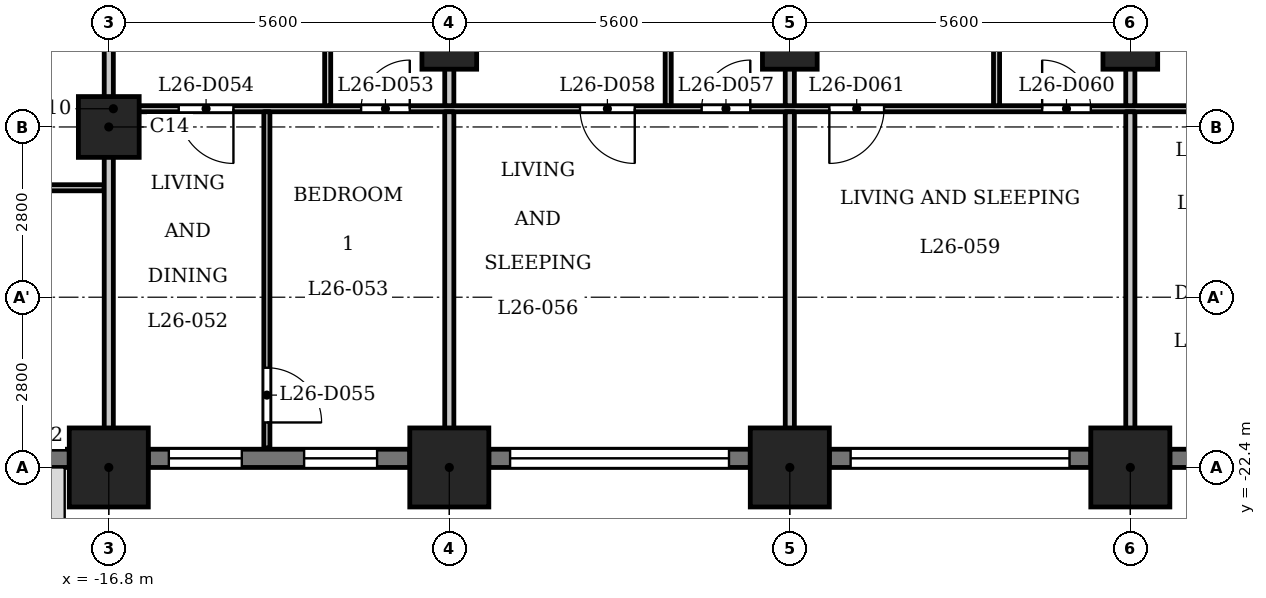
"""IFC4 building model, lengths in metres.
Left out: names, types, materials, properties, quantities, classifications, styles, units other than length and angle.
Written with IfcOpenShell. Run it as: python <this file> out.ifc"""

import sys

from ifc_helpers import new_model, si_unit, direction, frame, frame_2d, origin, origin_2d, place, context, subcontext, project, spatial, rectangle, extrude, element, fill, save


model = new_model("IFC4")
c1 = context("Model", 3, precision=1e-05, world=origin(), true_north=direction((0.0, 1.0)))
c2 = subcontext(c1, "Body", "Model", "MODEL_VIEW")
j1 = project(units=[si_unit("LENGTHUNIT", "METRE"), si_unit("PLANEANGLEUNIT", "RADIAN")], contexts=[c1])
p1 = place(None, origin())
s1 = spatial("IfcSite", under=j1, at=p1, CompositionType="ELEMENT")
p2 = place(p1, origin())
s2 = spatial("IfcBuilding", under=s1, at=p2, CompositionType="ELEMENT")
p3 = place(p2, frame((0.0, 0.0, 104.3)))
s3 = spatial("IfcBuildingStorey", under=s2, at=p3, CompositionType="ELEMENT", Elevation=104.3)
for number, where, z_axis, x_axis in (
    (1, (-16.8, -22.4, 0.0), (0.0, 0.0, 1.0), (1.0, 0.0, 0.0)),
    (2, (-11.2, -22.4, 0.0), (0.0, 0.0, 1.0), (1.0, 0.0, 0.0)),
    (3, (-5.6, -22.4, 0.0), (0.0, 0.0, 1.0), (1.0, 0.0, 0.0)),
    (4, (0.0, -22.4, 0.0), (0.0, 0.0, 1.0), (1.0, 0.0, 0.0)),
):
    element("IfcColumn", number, at=place(p3, frame(where, z_axis=z_axis, x_axis=x_axis)), inside=s3, PredefinedType="COLUMN", context=c2, shape_type="SweptSolid", body=[
        extrude(rectangle(XDim=1.3, YDim=1.3, at=origin_2d()), origin(), (0.0, 0.0, 1.0), 3.5),
    ])
p4 = place(p3, frame((-16.8, -16.8, 0.0), z_axis=(0.0, 0.0, 1.0), x_axis=(1.0, 0.0, 0.0)))
e5 = element("IfcColumn", 5, at=p4, inside=s3, PredefinedType="COLUMN", context=c2, shape_type="SweptSolid", body=[
    extrude(rectangle(XDim=1.0, YDim=1.0, at=origin_2d()), origin(), (0.0, 0.0, 1.0), 3.5),
])
for number, where, z_axis, x_axis in (
    (6, (-11.2, -15.4, 0.0), (0.0, 0.0, 1.0), (1.0, 0.0, 0.0)),
    (7, (-5.6, -15.4, 0.0), (0.0, 0.0, 1.0), (1.0, 0.0, 0.0)),
    (8, (0.0, -15.4, 0.0), (0.0, 0.0, 1.0), (1.0, 0.0, 0.0)),
):
    element("IfcColumn", number, at=place(p3, frame(where, z_axis=z_axis, x_axis=x_axis)), inside=s3, PredefinedType="COLUMN", context=c2, shape_type="SweptSolid", body=[
        extrude(rectangle(XDim=0.9, YDim=0.9, at=origin_2d()), origin(), (0.0, 0.0, 1.0), 3.5),
    ])
p5 = place(p3, frame((-20.0, -22.25, 0.0), z_axis=(0.0, 0.0, 1.0), x_axis=(1.0, 0.0, 0.0)))
e9 = element("IfcWall", 9, at=p5, inside=s3, PredefinedType="SOLIDWALL", context=c2, shape_type="SweptSolid", body=[
    extrude(rectangle(XDim=2.55, YDim=0.3, at=frame_2d((1.275, 0.0))), origin(), (0.0, 0.0, 1.0), 2.4),
])
p6 = place(p5, frame((0.375, 0.0, 0.9)))
e10 = element("IfcOpeningElement", 10, at=p6, cuts=e9, PredefinedType="OPENING", context=c2, shape_type="SweptSolid", body=[
    extrude(rectangle(XDim=1.8, YDim=1.25, at=frame_2d((0.9, 0.625))), frame((0.0, 0.16, 0.0), z_axis=(0.0, -1.0, 0.0), x_axis=(1.0, 0.0, 0.0)), (0.0, 0.0, 1.0), 0.32),
])
p7 = place(p3, frame((-16.15, -22.25, 0.0), z_axis=(0.0, 0.0, 1.0), x_axis=(1.0, 0.0, 0.0)))
e11 = element("IfcWall", 11, at=p7, inside=s3, PredefinedType="SOLIDWALL", context=c2, shape_type="SweptSolid", body=[
    extrude(rectangle(XDim=4.3, YDim=0.3, at=frame_2d((2.15, 0.0))), origin(), (0.0, 0.0, 1.0), 2.4),
])
p8 = place(p7, frame((0.337, 0.0, 0.6)))
e12 = element("IfcOpeningElement", 12, at=p8, cuts=e11, PredefinedType="OPENING", context=c2, shape_type="SweptSolid", body=[
    extrude(rectangle(XDim=1.2, YDim=1.55, at=frame_2d((0.6, 0.775))), frame((0.0, 0.16, 0.0), z_axis=(0.0, -1.0, 0.0), x_axis=(1.0, 0.0, 0.0)), (0.0, 0.0, 1.0), 0.32),
])
p9 = place(p7, frame((2.562, 0.0, 0.6)))
e13 = element("IfcOpeningElement", 13, at=p9, cuts=e11, PredefinedType="OPENING", context=c2, shape_type="SweptSolid", body=[
    extrude(rectangle(XDim=1.2, YDim=1.55, at=frame_2d((0.6, 0.775))), frame((0.0, 0.16, 0.0), z_axis=(0.0, -1.0, 0.0), x_axis=(1.0, 0.0, 0.0)), (0.0, 0.0, 1.0), 0.32),
])
p10 = place(p3, frame((-10.55, -22.25, 0.0), z_axis=(0.0, 0.0, 1.0), x_axis=(1.0, 0.0, 0.0)))
e14 = element("IfcWall", 14, at=p10, inside=s3, PredefinedType="SOLIDWALL", context=c2, shape_type="SweptSolid", body=[
    extrude(rectangle(XDim=4.3, YDim=0.3, at=frame_2d((2.15, 0.0))), origin(), (0.0, 0.0, 1.0), 2.4),
])
p11 = place(p10, frame((0.35, 0.0, 1.2)))
e15 = element("IfcOpeningElement", 15, at=p11, cuts=e14, PredefinedType="OPENING", context=c2, shape_type="SweptSolid", body=[
    extrude(rectangle(XDim=3.6, YDim=0.95, at=frame_2d((1.8, 0.475))), frame((0.0, 0.16, 0.0), z_axis=(0.0, -1.0, 0.0), x_axis=(1.0, 0.0, 0.0)), (0.0, 0.0, 1.0), 0.32),
])
p12 = place(p3, frame((-4.95, -22.25, 0.0), z_axis=(0.0, 0.0, 1.0), x_axis=(1.0, 0.0, 0.0)))
e16 = element("IfcWall", 16, at=p12, inside=s3, PredefinedType="SOLIDWALL", context=c2, shape_type="SweptSolid", body=[
    extrude(rectangle(XDim=4.3, YDim=0.3, at=frame_2d((2.15, 0.0))), origin(), (0.0, 0.0, 1.0), 2.4),
])
p13 = place(p12, frame((0.35, 0.0, 1.2)))
e17 = element("IfcOpeningElement", 17, at=p13, cuts=e16, PredefinedType="OPENING", context=c2, shape_type="SweptSolid", body=[
    extrude(rectangle(XDim=3.6, YDim=0.95, at=frame_2d((1.8, 0.475))), frame((0.0, 0.16, 0.0), z_axis=(0.0, -1.0, 0.0), x_axis=(1.0, 0.0, 0.0)), (0.0, 0.0, 1.0), 0.32),
])
p14 = place(p3, frame((0.65, -22.25, 0.0), z_axis=(0.0, 0.0, 1.0), x_axis=(1.0, 0.0, 0.0)))
e18 = element("IfcWall", 18, at=p14, inside=s3, PredefinedType="SOLIDWALL", context=c2, shape_type="SweptSolid", body=[
    extrude(rectangle(XDim=4.3, YDim=0.3, at=frame_2d((2.15, 0.0))), origin(), (0.0, 0.0, 1.0), 2.4),
])
p15 = place(p14, frame((0.337, 0.0, 0.9)))
e19 = element("IfcOpeningElement", 19, at=p15, cuts=e18, PredefinedType="OPENING", context=c2, shape_type="SweptSolid", body=[
    extrude(rectangle(XDim=1.8, YDim=1.25, at=frame_2d((0.9, 0.625))), frame((0.0, 0.16, 0.0), z_axis=(0.0, -1.0, 0.0), x_axis=(1.0, 0.0, 0.0)), (0.0, 0.0, 1.0), 0.32),
])
p16 = place(p14, frame((3.062, 0.0, 0.6)))
e20 = element("IfcOpeningElement", 20, at=p16, cuts=e18, PredefinedType="OPENING", context=c2, shape_type="SweptSolid", body=[
    extrude(rectangle(XDim=0.8, YDim=1.55, at=frame_2d((0.4, 0.775))), frame((0.0, 0.16, 0.0), z_axis=(0.0, -1.0, 0.0), x_axis=(1.0, 0.0, 0.0)), (0.0, 0.0, 1.0), 0.32),
])
p17 = place(p3, frame((-26.394, -17.8, 0.0), z_axis=(0.0, 0.0, 1.0), x_axis=(1.0, 0.0, 0.0)))
e21 = element("IfcWall", 21, at=p17, inside=s3, PredefinedType="PARTITIONING", context=c2, shape_type="SweptSolid", body=[
    extrude(rectangle(XDim=9.519, YDim=0.1, at=frame_2d((4.76, 0.0))), origin(), (0.0, 0.0, 1.0), 3.2),
])
p18 = place(p17, frame((0.794, 0.0, 0.0)))
e22 = element("IfcOpeningElement", 22, at=p18, cuts=e21, PredefinedType="OPENING", context=c2, shape_type="SweptSolid", body=[
    extrude(rectangle(XDim=0.8, YDim=2.1, at=frame_2d((0.4, 1.05))), frame((0.0, 0.06, 0.0), z_axis=(0.0, -1.0, 0.0), x_axis=(1.0, 0.0, 0.0)), (0.0, 0.0, 1.0), 0.12),
])
p19 = place(p17, frame((5.644, 0.0, 0.0)))
e23 = element("IfcOpeningElement", 23, at=p19, cuts=e21, PredefinedType="OPENING", context=c2, shape_type="SweptSolid", body=[
    extrude(rectangle(XDim=0.9, YDim=2.1, at=frame_2d((0.45, 1.05))), frame((0.0, 0.06, 0.0), z_axis=(0.0, -1.0, 0.0), x_axis=(1.0, 0.0, 0.0)), (0.0, 0.0, 1.0), 0.12),
])
p20 = place(p3, frame((-16.725, -16.5, 0.0), z_axis=(0.0, 0.0, 1.0), x_axis=(1.0, 0.0, 0.0)))
e24 = element("IfcWall", 24, at=p20, inside=s3, PredefinedType="PARTITIONING", context=c2, shape_type="SweptSolid", body=[
    extrude(rectangle(XDim=33.45, YDim=0.1, at=frame_2d((16.725, 0.0))), origin(), (0.0, 0.0, 1.0), 3.2),
])
p21 = place(p20, frame((4.075, 0.0, 0.0)))
e25 = element("IfcOpeningElement", 25, at=p21, cuts=e24, PredefinedType="OPENING", context=c2, shape_type="SweptSolid", body=[
    extrude(rectangle(XDim=0.8, YDim=2.1, at=frame_2d((0.4, 1.05))), frame((0.0, 0.06, 0.0), z_axis=(0.0, -1.0, 0.0), x_axis=(1.0, 0.0, 0.0)), (0.0, 0.0, 1.0), 0.12),
])
p22 = place(p20, frame((1.075, 0.0, 0.0)))
e26 = element("IfcOpeningElement", 26, at=p22, cuts=e24, PredefinedType="OPENING", context=c2, shape_type="SweptSolid", body=[
    extrude(rectangle(XDim=0.9, YDim=2.1, at=frame_2d((0.45, 1.05))), frame((0.0, 0.06, 0.0), z_axis=(0.0, -1.0, 0.0), x_axis=(1.0, 0.0, 0.0)), (0.0, 0.0, 1.0), 0.12),
])
p23 = place(p20, frame((9.675, 0.0, 0.0)))
e27 = element("IfcOpeningElement", 27, at=p23, cuts=e24, PredefinedType="OPENING", context=c2, shape_type="SweptSolid", body=[
    extrude(rectangle(XDim=0.8, YDim=2.1, at=frame_2d((0.4, 1.05))), frame((0.0, 0.06, 0.0), z_axis=(0.0, -1.0, 0.0), x_axis=(1.0, 0.0, 0.0)), (0.0, 0.0, 1.0), 0.12),
])
p24 = place(p20, frame((7.675, 0.0, 0.0)))
e28 = element("IfcOpeningElement", 28, at=p24, cuts=e24, PredefinedType="OPENING", context=c2, shape_type="SweptSolid", body=[
    extrude(rectangle(XDim=0.9, YDim=2.1, at=frame_2d((0.45, 1.05))), frame((0.0, 0.06, 0.0), z_axis=(0.0, -1.0, 0.0), x_axis=(1.0, 0.0, 0.0)), (0.0, 0.0, 1.0), 0.12),
])
p25 = place(p20, frame((15.275, 0.0, 0.0)))
e29 = element("IfcOpeningElement", 29, at=p25, cuts=e24, PredefinedType="OPENING", context=c2, shape_type="SweptSolid", body=[
    extrude(rectangle(XDim=0.8, YDim=2.1, at=frame_2d((0.4, 1.05))), frame((0.0, 0.06, 0.0), z_axis=(0.0, -1.0, 0.0), x_axis=(1.0, 0.0, 0.0)), (0.0, 0.0, 1.0), 0.12),
])
p26 = place(p20, frame((11.775, 0.0, 0.0)))
e30 = element("IfcOpeningElement", 30, at=p26, cuts=e24, PredefinedType="OPENING", context=c2, shape_type="SweptSolid", body=[
    extrude(rectangle(XDim=0.9, YDim=2.1, at=frame_2d((0.45, 1.05))), frame((0.0, 0.06, 0.0), z_axis=(0.0, -1.0, 0.0), x_axis=(1.0, 0.0, 0.0)), (0.0, 0.0, 1.0), 0.12),
])
p27 = place(p20, frame((20.625, 0.0, 0.0)))
e31 = element("IfcOpeningElement", 31, at=p27, cuts=e24, PredefinedType="OPENING", context=c2, shape_type="SweptSolid", body=[
    extrude(rectangle(XDim=0.8, YDim=2.1, at=frame_2d((0.4, 1.05))), frame((0.0, 0.06, 0.0), z_axis=(0.0, -1.0, 0.0), x_axis=(1.0, 0.0, 0.0)), (0.0, 0.0, 1.0), 0.12),
])
p28 = place(p20, frame((18.375, 0.0, 0.0)))
e32 = element("IfcOpeningElement", 32, at=p28, cuts=e24, PredefinedType="OPENING", context=c2, shape_type="SweptSolid", body=[
    extrude(rectangle(XDim=0.9, YDim=2.1, at=frame_2d((0.45, 1.05))), frame((0.0, 0.06, 0.0), z_axis=(0.0, -1.0, 0.0), x_axis=(1.0, 0.0, 0.0)), (0.0, 0.0, 1.0), 0.12),
])
p29 = place(p20, frame((26.475, 0.0, 0.0)))
e33 = element("IfcOpeningElement", 33, at=p29, cuts=e24, PredefinedType="OPENING", context=c2, shape_type="SweptSolid", body=[
    extrude(rectangle(XDim=0.8, YDim=2.1, at=frame_2d((0.4, 1.05))), frame((0.0, 0.06, 0.0), z_axis=(0.0, -1.0, 0.0), x_axis=(1.0, 0.0, 0.0)), (0.0, 0.0, 1.0), 0.12),
])
p30 = place(p20, frame((23.225, 0.0, 0.0)))
e34 = element("IfcOpeningElement", 34, at=p30, cuts=e24, PredefinedType="OPENING", context=c2, shape_type="SweptSolid", body=[
    extrude(rectangle(XDim=0.9, YDim=2.1, at=frame_2d((0.45, 1.05))), frame((0.0, 0.06, 0.0), z_axis=(0.0, -1.0, 0.0), x_axis=(1.0, 0.0, 0.0)), (0.0, 0.0, 1.0), 0.12),
])
p31 = place(p20, frame((29.475, 0.0, 0.0)))
e35 = element("IfcOpeningElement", 35, at=p31, cuts=e24, PredefinedType="OPENING", context=c2, shape_type="SweptSolid", body=[
    extrude(rectangle(XDim=0.8, YDim=2.1, at=frame_2d((0.4, 1.05))), frame((0.0, 0.06, 0.0), z_axis=(0.0, -1.0, 0.0), x_axis=(1.0, 0.0, 0.0)), (0.0, 0.0, 1.0), 0.12),
])
p32 = place(p20, frame((31.825, 0.0, 0.0)))
e36 = element("IfcOpeningElement", 36, at=p32, cuts=e24, PredefinedType="OPENING", context=c2, shape_type="SweptSolid", body=[
    extrude(rectangle(XDim=0.9, YDim=2.1, at=frame_2d((0.45, 1.05))), frame((0.0, 0.06, 0.0), z_axis=(0.0, -1.0, 0.0), x_axis=(1.0, 0.0, 0.0)), (0.0, 0.0, 1.0), 0.12),
])
p33 = place(p3, frame((-16.8, -23.03, 0.0), z_axis=(0.0, 0.0, 1.0), x_axis=(0.0, 1.0, 0.0)))
e37 = element("IfcWall", 37, at=p33, inside=s3, PredefinedType="PARTITIONING", context=c2, shape_type="SweptSolid", body=[
    extrude(rectangle(XDim=7.555, YDim=0.15, at=frame_2d((3.777, 0.0))), origin(), (0.0, 0.0, 1.0), 3.2),
])
p34 = place(p3, frame((-14.2, -22.08, 0.0), z_axis=(0.0, 0.0, 1.0), x_axis=(0.0, 1.0, 0.0)))
e38 = element("IfcWall", 38, at=p34, inside=s3, PredefinedType="PARTITIONING", context=c2, shape_type="SweptSolid", body=[
    extrude(rectangle(XDim=5.53, YDim=0.1, at=frame_2d((2.765, 0.0))), origin(), (0.0, 0.0, 1.0), 3.2),
])
p35 = place(p34, frame((0.42, 0.0, 0.0)))
e39 = element("IfcOpeningElement", 39, at=p35, cuts=e38, PredefinedType="OPENING", context=c2, shape_type="SweptSolid", body=[
    extrude(rectangle(XDim=0.9, YDim=2.1, at=frame_2d((0.45, 1.05))), frame((0.0, 0.06, 0.0), z_axis=(0.0, -1.0, 0.0), x_axis=(1.0, 0.0, 0.0)), (0.0, 0.0, 1.0), 0.12),
])
p36 = place(p3, frame((-13.2, -16.45, 0.0), z_axis=(0.0, 0.0, 1.0), x_axis=(0.0, 1.0, 0.0)))
e40 = element("IfcWall", 40, at=p36, inside=s3, PredefinedType="PARTITIONING", context=c2, shape_type="SweptSolid", body=[
    extrude(rectangle(XDim=3.175, YDim=0.1, at=frame_2d((1.587, 0.0))), origin(), (0.0, 0.0, 1.0), 3.2),
])
p37 = place(p3, frame((-11.2, -23.03, 0.0), z_axis=(0.0, 0.0, 1.0), x_axis=(0.0, 1.0, 0.0)))
e41 = element("IfcWall", 41, at=p37, inside=s3, PredefinedType="PARTITIONING", context=c2, shape_type="SweptSolid", body=[
    extrude(rectangle(XDim=6.48, YDim=0.15, at=frame_2d((3.24, 0.0))), origin(), (0.0, 0.0, 1.0), 3.2),
])
p38 = place(p3, frame((-11.2, -16.45, 0.0), z_axis=(0.0, 0.0, 1.0), x_axis=(0.0, 1.0, 0.0)))
e42 = element("IfcWall", 42, at=p38, inside=s3, PredefinedType="PARTITIONING", context=c2, shape_type="SweptSolid", body=[
    extrude(rectangle(XDim=3.175, YDim=0.15, at=frame_2d((1.587, 0.0))), origin(), (0.0, 0.0, 1.0), 3.2),
])
p39 = place(p3, frame((-7.6, -16.45, 0.0), z_axis=(0.0, 0.0, 1.0), x_axis=(0.0, 1.0, 0.0)))
e43 = element("IfcWall", 43, at=p39, inside=s3, PredefinedType="PARTITIONING", context=c2, shape_type="SweptSolid", body=[
    extrude(rectangle(XDim=3.175, YDim=0.1, at=frame_2d((1.587, 0.0))), origin(), (0.0, 0.0, 1.0), 3.2),
])
p40 = place(p3, frame((-5.6, -23.03, 0.0), z_axis=(0.0, 0.0, 1.0), x_axis=(0.0, 1.0, 0.0)))
e44 = element("IfcWall", 44, at=p40, inside=s3, PredefinedType="PARTITIONING", context=c2, shape_type="SweptSolid", body=[
    extrude(rectangle(XDim=6.48, YDim=0.15, at=frame_2d((3.24, 0.0))), origin(), (0.0, 0.0, 1.0), 3.2),
])
p41 = place(p3, frame((-5.6, -16.45, 0.0), z_axis=(0.0, 0.0, 1.0), x_axis=(0.0, 1.0, 0.0)))
e45 = element("IfcWall", 45, at=p41, inside=s3, PredefinedType="PARTITIONING", context=c2, shape_type="SweptSolid", body=[
    extrude(rectangle(XDim=3.175, YDim=0.15, at=frame_2d((1.587, 0.0))), origin(), (0.0, 0.0, 1.0), 3.2),
])
p42 = place(p3, frame((-2.2, -16.45, 0.0), z_axis=(0.0, 0.0, 1.0), x_axis=(0.0, 1.0, 0.0)))
e46 = element("IfcWall", 46, at=p42, inside=s3, PredefinedType="PARTITIONING", context=c2, shape_type="SweptSolid", body=[
    extrude(rectangle(XDim=3.175, YDim=0.1, at=frame_2d((1.587, 0.0))), origin(), (0.0, 0.0, 1.0), 3.2),
])
p43 = place(p3, frame((0.0, -23.03, 0.0), z_axis=(0.0, 0.0, 1.0), x_axis=(0.0, 1.0, 0.0)))
e47 = element("IfcWall", 47, at=p43, inside=s3, PredefinedType="PARTITIONING", context=c2, shape_type="SweptSolid", body=[
    extrude(rectangle(XDim=6.48, YDim=0.15, at=frame_2d((3.24, 0.0))), origin(), (0.0, 0.0, 1.0), 3.2),
])
p44 = place(p3, frame((0.0, -16.45, 0.0), z_axis=(0.0, 0.0, 1.0), x_axis=(0.0, 1.0, 0.0)))
e48 = element("IfcWall", 48, at=p44, inside=s3, PredefinedType="PARTITIONING", context=c2, shape_type="SweptSolid", body=[
    extrude(rectangle(XDim=3.175, YDim=0.15, at=frame_2d((1.587, 0.0))), origin(), (0.0, 0.0, 1.0), 3.2),
])
p45 = place(p21, origin())
e49 = element("IfcDoor", 49, at=p45, inside=s3, OperationType="SINGLE_SWING_LEFT", PredefinedType="DOOR", context=c2, shape_type="SweptSolid", body=[
    extrude(rectangle(XDim=0.8, YDim=2.1, at=frame_2d((0.4, 1.05))), frame((0.0, 0.025, 0.0), z_axis=(0.0, -1.0, 0.0), x_axis=(1.0, 0.0, 0.0)), (0.0, 0.0, 1.0), 0.05),
])
fill(e25, e49)
p46 = place(p22, origin())
e50 = element("IfcDoor", 50, at=p46, inside=s3, OperationType="SINGLE_SWING_RIGHT", PredefinedType="DOOR", context=c2, shape_type="SweptSolid", body=[
    extrude(rectangle(XDim=0.9, YDim=2.1, at=frame_2d((0.45, 1.05))), frame((0.0, 0.025, 0.0), z_axis=(0.0, -1.0, 0.0), x_axis=(1.0, 0.0, 0.0)), (0.0, 0.0, 1.0), 0.05),
])
fill(e26, e50)
p47 = place(p35, origin())
e51 = element("IfcDoor", 51, at=p47, inside=s3, OperationType="SINGLE_SWING_LEFT", PredefinedType="DOOR", context=c2, shape_type="SweptSolid", body=[
    extrude(rectangle(XDim=0.9, YDim=2.1, at=frame_2d((0.45, 1.05))), frame((0.0, 0.025, 0.0), z_axis=(0.0, -1.0, 0.0), x_axis=(1.0, 0.0, 0.0)), (0.0, 0.0, 1.0), 0.05),
])
fill(e39, e51)
p48 = place(p23, origin())
e52 = element("IfcDoor", 52, at=p48, inside=s3, OperationType="SINGLE_SWING_LEFT", PredefinedType="DOOR", context=c2, shape_type="SweptSolid", body=[
    extrude(rectangle(XDim=0.8, YDim=2.1, at=frame_2d((0.4, 1.05))), frame((0.0, 0.025, 0.0), z_axis=(0.0, -1.0, 0.0), x_axis=(1.0, 0.0, 0.0)), (0.0, 0.0, 1.0), 0.05),
])
fill(e27, e52)
p49 = place(p24, origin())
e53 = element("IfcDoor", 53, at=p49, inside=s3, OperationType="SINGLE_SWING_RIGHT", PredefinedType="DOOR", context=c2, shape_type="SweptSolid", body=[
    extrude(rectangle(XDim=0.9, YDim=2.1, at=frame_2d((0.45, 1.05))), frame((0.0, 0.025, 0.0), z_axis=(0.0, -1.0, 0.0), x_axis=(1.0, 0.0, 0.0)), (0.0, 0.0, 1.0), 0.05),
])
fill(e28, e53)
p50 = place(p25, origin())
e54 = element("IfcDoor", 54, at=p50, inside=s3, OperationType="SINGLE_SWING_RIGHT", PredefinedType="DOOR", context=c2, shape_type="SweptSolid", body=[
    extrude(rectangle(XDim=0.8, YDim=2.1, at=frame_2d((0.4, 1.05))), frame((0.0, 0.025, 0.0), z_axis=(0.0, -1.0, 0.0), x_axis=(1.0, 0.0, 0.0)), (0.0, 0.0, 1.0), 0.05),
])
fill(e29, e54)
p51 = place(p26, origin())
e55 = element("IfcDoor", 55, at=p51, inside=s3, OperationType="SINGLE_SWING_LEFT", PredefinedType="DOOR", context=c2, shape_type="SweptSolid", body=[
    extrude(rectangle(XDim=0.9, YDim=2.1, at=frame_2d((0.45, 1.05))), frame((0.0, 0.025, 0.0), z_axis=(0.0, -1.0, 0.0), x_axis=(1.0, 0.0, 0.0)), (0.0, 0.0, 1.0), 0.05),
])
fill(e30, e55)
p52 = place(p8, origin())
e56 = element("IfcWindow", 56, at=p52, inside=s3, PartitioningType="SINGLE_PANEL", PredefinedType="WINDOW", context=c2, shape_type="SweptSolid", body=[
    extrude(rectangle(XDim=1.2, YDim=1.55, at=frame_2d((0.6, 0.775))), frame((0.0, 0.03, 0.0), z_axis=(0.0, -1.0, 0.0), x_axis=(1.0, 0.0, 0.0)), (0.0, 0.0, 1.0), 0.06),
])
fill(e12, e56)
p53 = place(p9, origin())
e57 = element("IfcWindow", 57, at=p53, inside=s3, PartitioningType="SINGLE_PANEL", PredefinedType="WINDOW", context=c2, shape_type="SweptSolid", body=[
    extrude(rectangle(XDim=1.2, YDim=1.55, at=frame_2d((0.6, 0.775))), frame((0.0, 0.03, 0.0), z_axis=(0.0, -1.0, 0.0), x_axis=(1.0, 0.0, 0.0)), (0.0, 0.0, 1.0), 0.06),
])
fill(e13, e57)
p54 = place(p11, origin())
e58 = element("IfcWindow", 58, at=p54, inside=s3, PartitioningType="SINGLE_PANEL", PredefinedType="WINDOW", context=c2, shape_type="SweptSolid", body=[
    extrude(rectangle(XDim=3.6, YDim=0.95, at=frame_2d((1.8, 0.475))), frame((0.0, 0.03, 0.0), z_axis=(0.0, -1.0, 0.0), x_axis=(1.0, 0.0, 0.0)), (0.0, 0.0, 1.0), 0.06),
])
fill(e15, e58)
p55 = place(p13, origin())
e59 = element("IfcWindow", 59, at=p55, inside=s3, PartitioningType="SINGLE_PANEL", PredefinedType="WINDOW", context=c2, shape_type="SweptSolid", body=[
    extrude(rectangle(XDim=3.6, YDim=0.95, at=frame_2d((1.8, 0.475))), frame((0.0, 0.03, 0.0), z_axis=(0.0, -1.0, 0.0), x_axis=(1.0, 0.0, 0.0)), (0.0, 0.0, 1.0), 0.06),
])
fill(e17, e59)
save(model, sys.argv[1])
